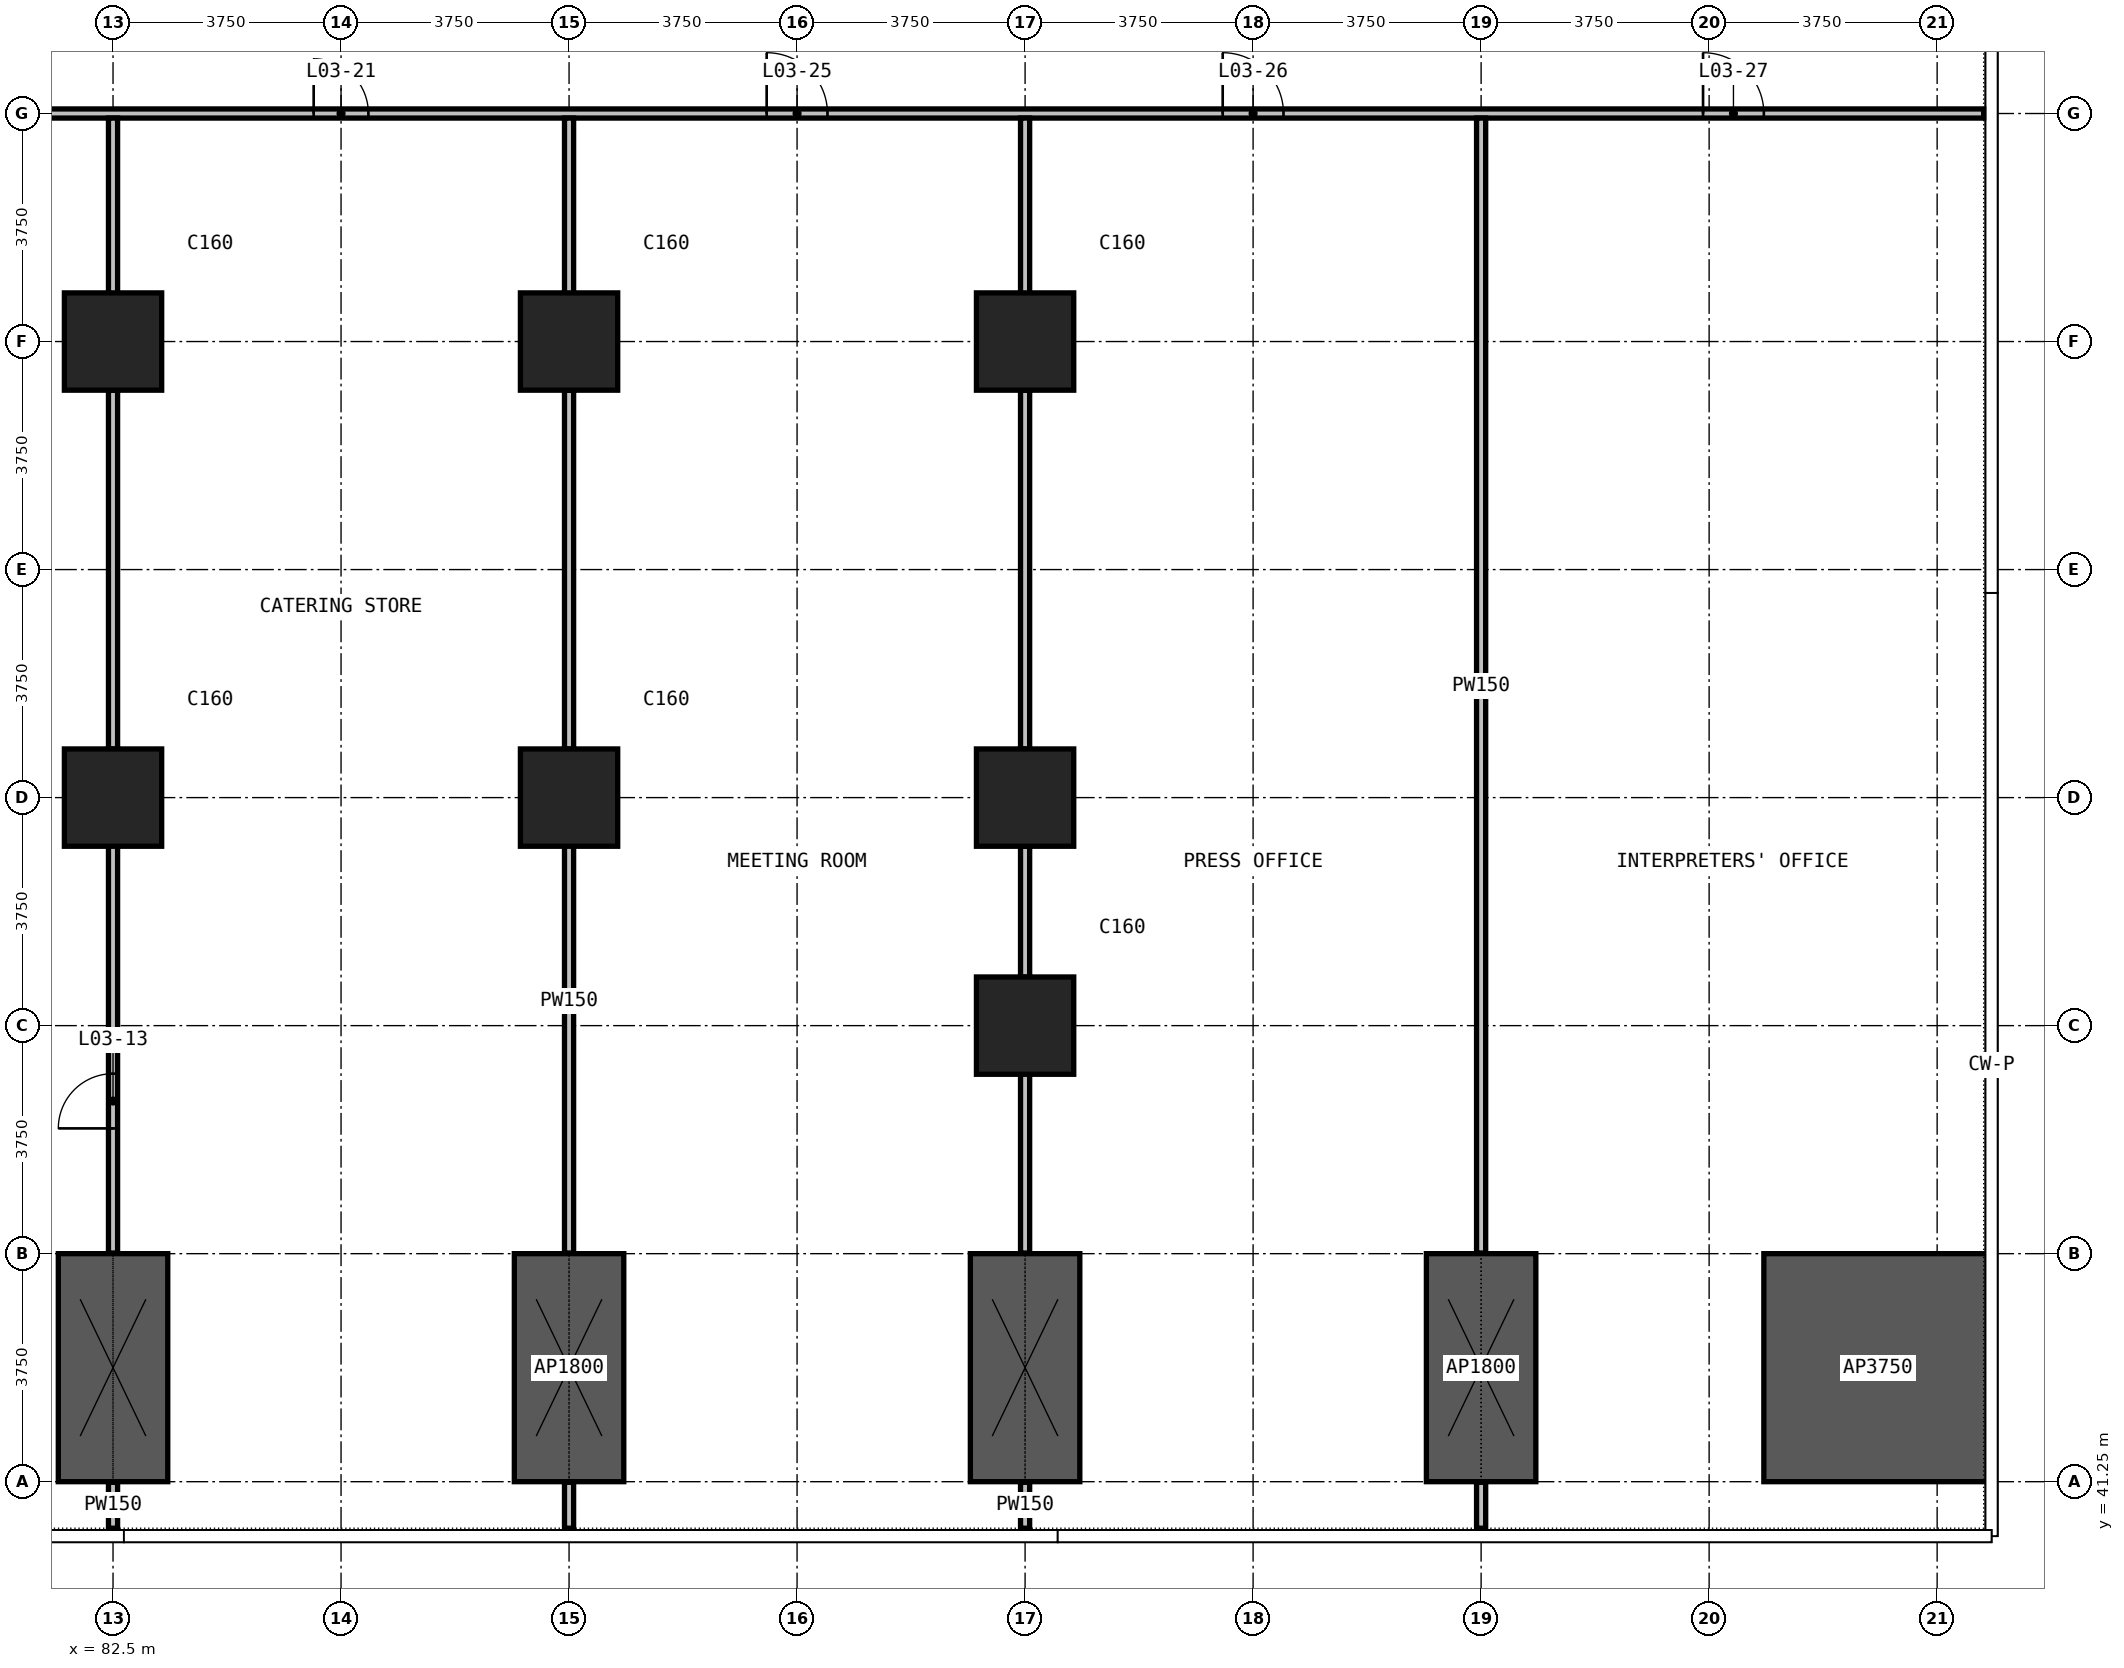
"""IFC4 building model, lengths in metres.
Left out: names, types, materials, properties, quantities, classifications, styles, units other than length and angle.
Written with IfcOpenShell. Run it as: python <this file> out.ifc"""

import sys

from ifc_helpers import new_model, si_unit, direction, frame, frame_2d, origin, origin_2d, place, context, subcontext, project, spatial, rectangle, extrude, element, fill, save


model = new_model("IFC4")
c1 = context("Model", 3, precision=1e-05, world=origin(), true_north=direction((0.0, 1.0)))
c2 = subcontext(c1, "Body", "Model", "MODEL_VIEW")
j1 = project(units=[si_unit("LENGTHUNIT", "METRE"), si_unit("PLANEANGLEUNIT", "RADIAN")], contexts=[c1])
p1 = place(None, origin())
s1 = spatial("IfcSite", under=j1, at=p1, CompositionType="ELEMENT")
p2 = place(p1, origin())
s2 = spatial("IfcBuilding", under=s1, at=p2, CompositionType="ELEMENT")
p3 = place(p2, frame((0.0, 0.0, 24.0)))
s3 = spatial("IfcBuildingStorey", under=s2, at=p3, CompositionType="ELEMENT", Elevation=24.0)
for number, where, z_axis, x_axis in (
    (1, (82.5, 41.25, 0.0), (0.0, 0.0, 1.0), (0.0, 1.0, 0.0)),
    (2, (90.0, 41.25, 0.0), (0.0, 0.0, 1.0), (0.0, 1.0, 0.0)),
    (3, (97.5, 41.25, 0.0), (0.0, 0.0, 1.0), (0.0, 1.0, 0.0)),
    (4, (105.0, 41.25, 0.0), (0.0, 0.0, 1.0), (0.0, 1.0, 0.0)),
):
    element("IfcWall", number, at=place(p3, frame(where, z_axis=z_axis, x_axis=x_axis)), inside=s3, PredefinedType="SHEAR", context=c2, shape_type="SweptSolid", body=[
        extrude(rectangle(XDim=3.75, YDim=1.8, at=frame_2d((1.875, 0.0))), origin(), (0.0, 0.0, 1.0), 6.0),
    ])
p4 = place(p3, frame((111.525, 41.25, 0.0), z_axis=(0.0, 0.0, 1.0), x_axis=(0.0, 1.0, 0.0)))
e5 = element("IfcWall", 5, at=p4, inside=s3, PredefinedType="SHEAR", context=c2, shape_type="SweptSolid", body=[
    extrude(rectangle(XDim=3.75, YDim=3.75, at=frame_2d((1.875, 0.0))), origin(), (0.0, 0.0, 1.0), 6.0),
])
for number, where, z_axis, x_axis in (
    (6, (82.5, 52.5, 0.0), (0.0, 0.0, 1.0), (1.0, 0.0, 0.0)),
    (7, (82.5, 60.0, 0.0), (0.0, 0.0, 1.0), (1.0, 0.0, 0.0)),
    (8, (90.0, 52.5, 0.0), (0.0, 0.0, 1.0), (1.0, 0.0, 0.0)),
    (9, (90.0, 60.0, 0.0), (0.0, 0.0, 1.0), (1.0, 0.0, 0.0)),
    (10, (97.5, 48.75, 0.0), (0.0, 0.0, 1.0), (1.0, 0.0, 0.0)),
    (11, (97.5, 52.5, 0.0), (0.0, 0.0, 1.0), (1.0, 0.0, 0.0)),
    (12, (97.5, 60.0, 0.0), (0.0, 0.0, 1.0), (1.0, 0.0, 0.0)),
):
    element("IfcColumn", number, at=place(p3, frame(where, z_axis=z_axis, x_axis=x_axis)), inside=s3, PredefinedType="COLUMN", context=c2, shape_type="SweptSolid", body=[
        extrude(rectangle(XDim=1.6, YDim=1.6, at=origin_2d()), origin(), (0.0, 0.0, 1.0), 6.0),
    ])
p5 = place(p3, frame((36.735, 63.75, 0.0), z_axis=(0.0, 0.0, 1.0), x_axis=(1.0, 0.0, 0.0)))
e13 = element("IfcWall", 13, at=p5, inside=s3, PredefinedType="PARTITIONING", context=c2, shape_type="SweptSolid", body=[
    extrude(rectangle(XDim=76.53, YDim=0.15, at=frame_2d((38.265, 0.0))), origin(), (0.0, 0.0, 1.0), 5.65),
])
p6 = place(p5, frame((33.615, 0.0, 0.0)))
e14 = element("IfcOpeningElement", 14, at=p6, cuts=e13, PredefinedType="OPENING", context=c2, shape_type="SweptSolid", body=[
    extrude(rectangle(XDim=1.8, YDim=2.2, at=frame_2d((0.9, 1.1))), frame((0.0, 0.085, 0.0), z_axis=(0.0, -1.0, 0.0), x_axis=(1.0, 0.0, 0.0)), (0.0, 0.0, 1.0), 0.17),
])
p7 = place(p5, frame((41.115, 0.0, 0.0)))
e15 = element("IfcOpeningElement", 15, at=p7, cuts=e13, PredefinedType="OPENING", context=c2, shape_type="SweptSolid", body=[
    extrude(rectangle(XDim=1.8, YDim=2.2, at=frame_2d((0.9, 1.1))), frame((0.0, 0.085, 0.0), z_axis=(0.0, -1.0, 0.0), x_axis=(1.0, 0.0, 0.0)), (0.0, 0.0, 1.0), 0.17),
])
p8 = place(p5, frame((26.565, 0.0, 0.0)))
e16 = element("IfcOpeningElement", 16, at=p8, cuts=e13, PredefinedType="OPENING", context=c2, shape_type="SweptSolid", body=[
    extrude(rectangle(XDim=0.9, YDim=2.2, at=frame_2d((0.45, 1.1))), frame((0.0, 0.085, 0.0), z_axis=(0.0, -1.0, 0.0), x_axis=(1.0, 0.0, 0.0)), (0.0, 0.0, 1.0), 0.17),
])
p9 = place(p5, frame((49.065, 0.0, 0.0)))
e17 = element("IfcOpeningElement", 17, at=p9, cuts=e13, PredefinedType="OPENING", context=c2, shape_type="SweptSolid", body=[
    extrude(rectangle(XDim=0.9, YDim=2.2, at=frame_2d((0.45, 1.1))), frame((0.0, 0.085, 0.0), z_axis=(0.0, -1.0, 0.0), x_axis=(1.0, 0.0, 0.0)), (0.0, 0.0, 1.0), 0.17),
])
p10 = place(p5, frame((3.65, 0.0, 0.0)))
e18 = element("IfcOpeningElement", 18, at=p10, cuts=e13, PredefinedType="OPENING", context=c2, shape_type="SweptSolid", body=[
    extrude(rectangle(XDim=1.0, YDim=2.2, at=frame_2d((0.5, 1.1))), frame((0.0, 0.085, 0.0), z_axis=(0.0, -1.0, 0.0), x_axis=(1.0, 0.0, 0.0)), (0.0, 0.0, 1.0), 0.17),
])
p11 = place(p5, frame((11.515, 0.0, 0.0)))
e19 = element("IfcOpeningElement", 19, at=p11, cuts=e13, PredefinedType="OPENING", context=c2, shape_type="SweptSolid", body=[
    extrude(rectangle(XDim=1.0, YDim=2.2, at=frame_2d((0.5, 1.1))), frame((0.0, 0.085, 0.0), z_axis=(0.0, -1.0, 0.0), x_axis=(1.0, 0.0, 0.0)), (0.0, 0.0, 1.0), 0.17),
])
p12 = place(p5, frame((19.015, 0.0, 0.0)))
e20 = element("IfcOpeningElement", 20, at=p12, cuts=e13, PredefinedType="OPENING", context=c2, shape_type="SweptSolid", body=[
    extrude(rectangle(XDim=1.0, YDim=2.2, at=frame_2d((0.5, 1.1))), frame((0.0, 0.085, 0.0), z_axis=(0.0, -1.0, 0.0), x_axis=(1.0, 0.0, 0.0)), (0.0, 0.0, 1.0), 0.17),
])
p13 = place(p5, frame((56.515, 0.0, 0.0)))
e21 = element("IfcOpeningElement", 21, at=p13, cuts=e13, PredefinedType="OPENING", context=c2, shape_type="SweptSolid", body=[
    extrude(rectangle(XDim=1.0, YDim=2.2, at=frame_2d((0.5, 1.1))), frame((0.0, 0.085, 0.0), z_axis=(0.0, -1.0, 0.0), x_axis=(1.0, 0.0, 0.0)), (0.0, 0.0, 1.0), 0.17),
])
p14 = place(p5, frame((64.015, 0.0, 0.0)))
e22 = element("IfcOpeningElement", 22, at=p14, cuts=e13, PredefinedType="OPENING", context=c2, shape_type="SweptSolid", body=[
    extrude(rectangle(XDim=1.0, YDim=2.2, at=frame_2d((0.5, 1.1))), frame((0.0, 0.085, 0.0), z_axis=(0.0, -1.0, 0.0), x_axis=(1.0, 0.0, 0.0)), (0.0, 0.0, 1.0), 0.17),
])
p15 = place(p5, frame((71.915, 0.0, 0.0)))
e23 = element("IfcOpeningElement", 23, at=p15, cuts=e13, PredefinedType="OPENING", context=c2, shape_type="SweptSolid", body=[
    extrude(rectangle(XDim=1.0, YDim=2.2, at=frame_2d((0.5, 1.1))), frame((0.0, 0.085, 0.0), z_axis=(0.0, -1.0, 0.0), x_axis=(1.0, 0.0, 0.0)), (0.0, 0.0, 1.0), 0.17),
])
p16 = place(p3, frame((82.5, 40.485, 0.0), z_axis=(0.0, 0.0, 1.0), x_axis=(0.0, 1.0, 0.0)))
e24 = element("IfcWall", 24, at=p16, inside=s3, PredefinedType="PARTITIONING", context=c2, shape_type="SweptSolid", body=[
    extrude(rectangle(XDim=0.755, YDim=0.15, at=frame_2d((0.377, 0.0))), origin(), (0.0, 0.0, 1.0), 5.65),
])
p17 = place(p3, frame((82.5, 45.01, 0.0), z_axis=(0.0, 0.0, 1.0), x_axis=(0.0, 1.0, 0.0)))
e25 = element("IfcWall", 25, at=p17, inside=s3, PredefinedType="PARTITIONING", context=c2, shape_type="SweptSolid", body=[
    extrude(rectangle(XDim=8.29, YDim=0.15, at=frame_2d((4.145, 0.0))), origin(), (0.0, 0.0, 1.0), 5.65),
])
p18 = place(p17, frame((2.05, 0.0, 0.0)))
e26 = element("IfcOpeningElement", 26, at=p18, cuts=e25, PredefinedType="OPENING", context=c2, shape_type="SweptSolid", body=[
    extrude(rectangle(XDim=0.9, YDim=2.2, at=frame_2d((0.45, 1.1))), frame((0.0, 0.085, 0.0), z_axis=(0.0, -1.0, 0.0), x_axis=(1.0, 0.0, 0.0)), (0.0, 0.0, 1.0), 0.17),
])
p19 = place(p3, frame((82.5, 53.3, 0.0), z_axis=(0.0, 0.0, 1.0), x_axis=(0.0, 1.0, 0.0)))
e27 = element("IfcWall", 27, at=p19, inside=s3, PredefinedType="PARTITIONING", context=c2, shape_type="SweptSolid", body=[
    extrude(rectangle(XDim=5.901, YDim=0.15, at=frame_2d((2.95, 0.0))), origin(), (0.0, 0.0, 1.0), 4.85),
])
p20 = place(p3, frame((82.5, 59.201, 0.0), z_axis=(0.0, 0.0, 1.0), x_axis=(0.0, 1.0, 0.0)))
e28 = element("IfcWall", 28, at=p20, inside=s3, PredefinedType="PARTITIONING", context=c2, shape_type="SweptSolid", body=[
    extrude(rectangle(XDim=4.474, YDim=0.15, at=frame_2d((2.237, 0.0))), origin(), (0.0, 0.0, 1.0), 5.65),
])
p21 = place(p3, frame((90.0, 40.485, 0.0), z_axis=(0.0, 0.0, 1.0), x_axis=(0.0, 1.0, 0.0)))
e29 = element("IfcWall", 29, at=p21, inside=s3, PredefinedType="PARTITIONING", context=c2, shape_type="SweptSolid", body=[
    extrude(rectangle(XDim=0.755, YDim=0.15, at=frame_2d((0.377, 0.0))), origin(), (0.0, 0.0, 1.0), 5.65),
])
p22 = place(p3, frame((90.0, 45.01, 0.0), z_axis=(0.0, 0.0, 1.0), x_axis=(0.0, 1.0, 0.0)))
e30 = element("IfcWall", 30, at=p22, inside=s3, PredefinedType="PARTITIONING", context=c2, shape_type="SweptSolid", body=[
    extrude(rectangle(XDim=8.29, YDim=0.15, at=frame_2d((4.145, 0.0))), origin(), (0.0, 0.0, 1.0), 5.65),
])
p23 = place(p3, frame((90.0, 53.3, 0.0), z_axis=(0.0, 0.0, 1.0), x_axis=(0.0, 1.0, 0.0)))
e31 = element("IfcWall", 31, at=p23, inside=s3, PredefinedType="PARTITIONING", context=c2, shape_type="SweptSolid", body=[
    extrude(rectangle(XDim=5.901, YDim=0.15, at=frame_2d((2.95, 0.0))), origin(), (0.0, 0.0, 1.0), 4.85),
])
p24 = place(p3, frame((90.0, 59.201, 0.0), z_axis=(0.0, 0.0, 1.0), x_axis=(0.0, 1.0, 0.0)))
e32 = element("IfcWall", 32, at=p24, inside=s3, PredefinedType="PARTITIONING", context=c2, shape_type="SweptSolid", body=[
    extrude(rectangle(XDim=4.474, YDim=0.15, at=frame_2d((2.237, 0.0))), origin(), (0.0, 0.0, 1.0), 5.65),
])
p25 = place(p3, frame((97.5, 40.485, 0.0), z_axis=(0.0, 0.0, 1.0), x_axis=(0.0, 1.0, 0.0)))
e33 = element("IfcWall", 33, at=p25, inside=s3, PredefinedType="PARTITIONING", context=c2, shape_type="SweptSolid", body=[
    extrude(rectangle(XDim=0.755, YDim=0.15, at=frame_2d((0.377, 0.0))), origin(), (0.0, 0.0, 1.0), 5.65),
])
p26 = place(p3, frame((97.5, 45.01, 0.0), z_axis=(0.0, 0.0, 1.0), x_axis=(0.0, 1.0, 0.0)))
e34 = element("IfcWall", 34, at=p26, inside=s3, PredefinedType="PARTITIONING", context=c2, shape_type="SweptSolid", body=[
    extrude(rectangle(XDim=4.539, YDim=0.15, at=frame_2d((2.27, 0.0))), origin(), (0.0, 0.0, 1.0), 5.65),
])
p27 = place(p3, frame((97.5, 49.549, 0.0), z_axis=(0.0, 0.0, 1.0), x_axis=(0.0, 1.0, 0.0)))
e35 = element("IfcWall", 35, at=p27, inside=s3, PredefinedType="PARTITIONING", context=c2, shape_type="SweptSolid", body=[
    extrude(rectangle(XDim=2.152, YDim=0.15, at=frame_2d((1.076, 0.0))), origin(), (0.0, 0.0, 1.0), 4.85),
])
p28 = place(p3, frame((97.5, 51.701, 0.0), z_axis=(0.0, 0.0, 1.0), x_axis=(0.0, 1.0, 0.0)))
e36 = element("IfcWall", 36, at=p28, inside=s3, PredefinedType="PARTITIONING", context=c2, shape_type="SweptSolid", body=[
    extrude(rectangle(XDim=1.599, YDim=0.15, at=frame_2d((0.8, 0.0))), origin(), (0.0, 0.0, 1.0), 5.65),
])
p29 = place(p3, frame((97.5, 53.3, 0.0), z_axis=(0.0, 0.0, 1.0), x_axis=(0.0, 1.0, 0.0)))
e37 = element("IfcWall", 37, at=p29, inside=s3, PredefinedType="PARTITIONING", context=c2, shape_type="SweptSolid", body=[
    extrude(rectangle(XDim=5.901, YDim=0.15, at=frame_2d((2.95, 0.0))), origin(), (0.0, 0.0, 1.0), 4.85),
])
p30 = place(p3, frame((97.5, 59.201, 0.0), z_axis=(0.0, 0.0, 1.0), x_axis=(0.0, 1.0, 0.0)))
e38 = element("IfcWall", 38, at=p30, inside=s3, PredefinedType="PARTITIONING", context=c2, shape_type="SweptSolid", body=[
    extrude(rectangle(XDim=4.474, YDim=0.15, at=frame_2d((2.237, 0.0))), origin(), (0.0, 0.0, 1.0), 5.65),
])
p31 = place(p3, frame((105.0, 40.485, 0.0), z_axis=(0.0, 0.0, 1.0), x_axis=(0.0, 1.0, 0.0)))
e39 = element("IfcWall", 39, at=p31, inside=s3, PredefinedType="PARTITIONING", context=c2, shape_type="SweptSolid", body=[
    extrude(rectangle(XDim=0.755, YDim=0.15, at=frame_2d((0.377, 0.0))), origin(), (0.0, 0.0, 1.0), 5.65),
])
p32 = place(p3, frame((105.0, 45.01, 0.0), z_axis=(0.0, 0.0, 1.0), x_axis=(0.0, 1.0, 0.0)))
e40 = element("IfcWall", 40, at=p32, inside=s3, PredefinedType="PARTITIONING", context=c2, shape_type="SweptSolid", body=[
    extrude(rectangle(XDim=18.665, YDim=0.15, at=frame_2d((9.333, 0.0))), origin(), (0.0, 0.0, 1.0), 5.65),
])
p33 = place(p18, origin())
e41 = element("IfcDoor", 41, at=p33, inside=s3, OperationType="SINGLE_SWING_LEFT", PredefinedType="DOOR", context=c2, shape_type="SweptSolid", body=[
    extrude(rectangle(XDim=0.9, YDim=2.2, at=frame_2d((0.45, 1.1))), frame((0.0, 0.025, 0.0), z_axis=(0.0, -1.0, 0.0), x_axis=(1.0, 0.0, 0.0)), (0.0, 0.0, 1.0), 0.05),
])
fill(e26, e41)
p34 = place(p9, origin())
e42 = element("IfcDoor", 42, at=p34, inside=s3, OperationType="SINGLE_SWING_RIGHT", PredefinedType="DOOR", context=c2, shape_type="SweptSolid", body=[
    extrude(rectangle(XDim=0.9, YDim=2.2, at=frame_2d((0.45, 1.1))), frame((0.0, 0.025, 0.0), z_axis=(0.0, -1.0, 0.0), x_axis=(1.0, 0.0, 0.0)), (0.0, 0.0, 1.0), 0.05),
])
fill(e17, e42)
p35 = place(p13, origin())
e43 = element("IfcDoor", 43, at=p35, inside=s3, OperationType="SINGLE_SWING_RIGHT", PredefinedType="DOOR", context=c2, shape_type="SweptSolid", body=[
    extrude(rectangle(XDim=1.0, YDim=2.2, at=frame_2d((0.5, 1.1))), frame((0.0, 0.025, 0.0), z_axis=(0.0, -1.0, 0.0), x_axis=(1.0, 0.0, 0.0)), (0.0, 0.0, 1.0), 0.05),
])
fill(e21, e43)
p36 = place(p14, origin())
e44 = element("IfcDoor", 44, at=p36, inside=s3, OperationType="SINGLE_SWING_LEFT", PredefinedType="DOOR", context=c2, shape_type="SweptSolid", body=[
    extrude(rectangle(XDim=1.0, YDim=2.2, at=frame_2d((0.5, 1.1))), frame((0.0, 0.025, 0.0), z_axis=(0.0, -1.0, 0.0), x_axis=(1.0, 0.0, 0.0)), (0.0, 0.0, 1.0), 0.05),
])
fill(e22, e44)
p37 = place(p15, origin())
e45 = element("IfcDoor", 45, at=p37, inside=s3, OperationType="SINGLE_SWING_RIGHT", PredefinedType="DOOR", context=c2, shape_type="SweptSolid", body=[
    extrude(rectangle(XDim=1.0, YDim=2.2, at=frame_2d((0.5, 1.1))), frame((0.0, 0.025, 0.0), z_axis=(0.0, -1.0, 0.0), x_axis=(1.0, 0.0, 0.0)), (0.0, 0.0, 1.0), 0.05),
])
fill(e23, e45)
save(model, sys.argv[1])
